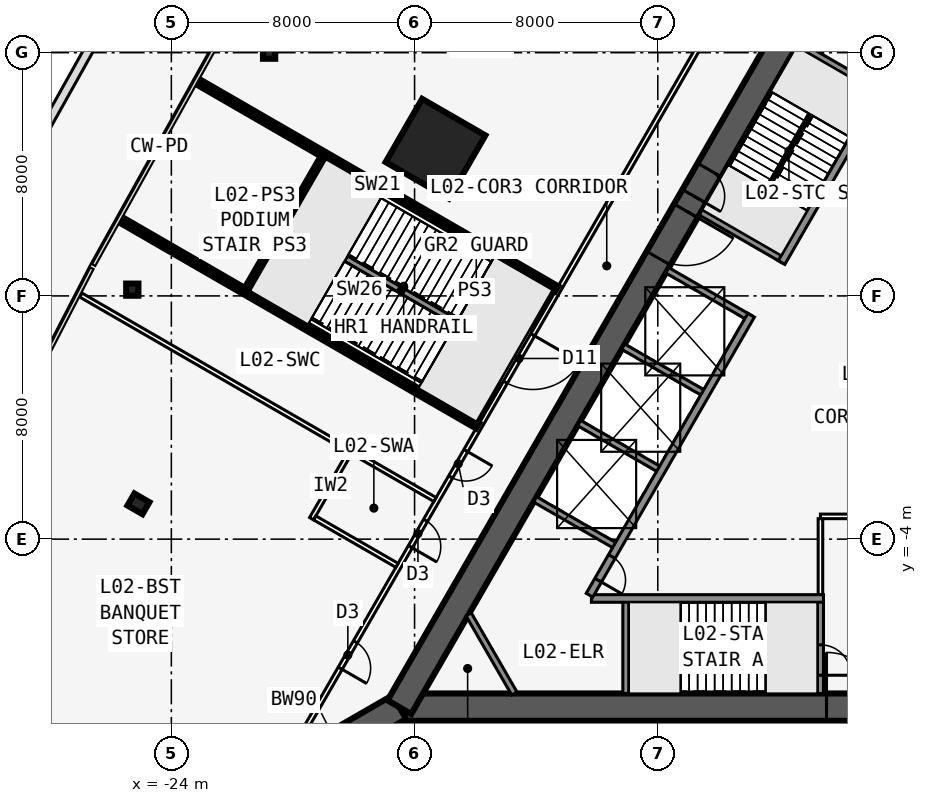
"""IFC4 building model, lengths in metres.
Left out: names, types, materials, properties, quantities, classifications, styles, units other than length and angle.
Written with IfcOpenShell. Run it as: python <this file> out.ifc"""

import sys

from ifc_helpers import new_model, si_unit, direction, frame, frame_2d, origin, origin_2d, place, context, subcontext, project, spatial, rectangle, i_section, extrude, element, fill, save


model = new_model("IFC4")
c1 = context("Model", 3, precision=1e-05, world=origin(), true_north=direction((0.0, 1.0)))
c2 = subcontext(c1, "Body", "Model", "MODEL_VIEW")
j1 = project(units=[si_unit("LENGTHUNIT", "METRE"), si_unit("PLANEANGLEUNIT", "RADIAN")], contexts=[c1])
p1 = place(None, origin())
s1 = spatial("IfcSite", under=j1, at=p1, CompositionType="ELEMENT")
p2 = place(p1, origin())
s2 = spatial("IfcBuilding", under=s1, at=p2, CompositionType="ELEMENT")
p3 = place(p2, frame((0.0, 0.0, 11.0)))
s3 = spatial("IfcBuildingStorey", under=s2, at=p3, CompositionType="ELEMENT", Elevation=11.0)
p4 = place(p3, frame((-16.5, -9.526, 0.0), z_axis=(0.0, 0.0, 1.0), x_axis=(1.0, 0.0, 0.0)))
e1 = element("IfcWall", 1, at=p4, inside=s3, PredefinedType="SHEAR", context=c2, shape_type="SweptSolid", body=[
    extrude(rectangle(XDim=33.0, YDim=0.9, at=frame_2d((16.5, 0.0))), origin(), (0.0, 0.0, 1.0), 6.5),
])
p5 = place(p4, frame((14.05, 0.0, 0.0)))
e2 = element("IfcOpeningElement", 2, at=p5, cuts=e1, PredefinedType="OPENING", context=c2, shape_type="SweptSolid", body=[
    extrude(rectangle(XDim=1.8, YDim=2.13, at=frame_2d((0.9, 1.065))), frame((0.0, 0.46, 0.0), z_axis=(0.0, -1.0, 0.0), x_axis=(1.0, 0.0, 0.0)), (0.0, 0.0, 1.0), 0.92),
])
p6 = place(p3, frame((-10.183, -5.951, 0.0), z_axis=(0.0, 0.0, 1.0), x_axis=(1.0, 0.0, 0.0)))
e3 = element("IfcWall", 3, at=p6, inside=s3, PredefinedType="SOLIDWALL", context=c2, shape_type="SweptSolid", body=[
    extrude(rectangle(XDim=7.633, YDim=0.25, at=frame_2d((3.816, 0.0))), origin(), (0.0, 0.0, 1.0), 6.25),
])
p7 = place(p3, frame((-9.05, -5.951, 0.0), z_axis=(0.0, 0.0, 1.0), x_axis=(0.0, -1.0, 0.0)))
e4 = element("IfcWall", 4, at=p7, inside=s3, PredefinedType="SOLIDWALL", context=c2, shape_type="SweptSolid", body=[
    extrude(rectangle(XDim=3.125, YDim=0.2, at=frame_2d((1.562, 0.0))), origin(), (0.0, 0.0, 1.0), 6.25),
])
p8 = place(p3, frame((-2.65, -5.951, 0.0), z_axis=(0.0, 0.0, 1.0), x_axis=(0.0, -1.0, 0.0)))
e5 = element("IfcWall", 5, at=p8, inside=s3, PredefinedType="SOLIDWALL", context=c2, shape_type="SweptSolid", body=[
    extrude(rectangle(XDim=3.125, YDim=0.2, at=frame_2d((1.562, 0.0))), origin(), (0.0, 0.0, 1.0), 6.25),
])
p9 = place(p8, frame((1.525, 0.0, 0.0)))
e6 = element("IfcOpeningElement", 6, at=p9, cuts=e5, PredefinedType="OPENING", context=c2, shape_type="SweptSolid", body=[
    extrude(rectangle(XDim=1.0, YDim=2.13, at=frame_2d((0.5, 1.065))), frame((0.0, 0.11, 0.0), z_axis=(0.0, -1.0, 0.0), x_axis=(1.0, 0.0, 0.0)), (0.0, 0.0, 1.0), 0.22),
])
p10 = place(p3, frame((0.0, 19.052, 0.0), z_axis=(0.0, 0.0, 1.0), x_axis=(-0.499999749417, -0.866025548458, 0.0)))
e7 = element("IfcWall", 7, at=p10, inside=s3, PredefinedType="SHEAR", context=c2, shape_type="SweptSolid", body=[
    extrude(rectangle(XDim=33.0, YDim=0.9, at=frame_2d((16.5, 0.0))), origin(), (0.0, 0.0, 1.0), 6.5),
])
p11 = place(p10, frame((14.15, 0.0, 0.0)))
e8 = element("IfcOpeningElement", 8, at=p11, cuts=e7, PredefinedType="OPENING", context=c2, shape_type="SweptSolid", body=[
    extrude(rectangle(XDim=1.8, YDim=2.13, at=frame_2d((0.9, 1.065))), frame((0.0, 0.46, 0.0), z_axis=(0.0, -1.0, 0.0), x_axis=(1.0, 0.0, 0.0)), (0.0, 0.0, 1.0), 0.92),
])
p12 = place(p10, frame((12.6, 0.0, 0.0)))
e9 = element("IfcOpeningElement", 9, at=p12, cuts=e7, PredefinedType="OPENING", context=c2, shape_type="SweptSolid", body=[
    extrude(rectangle(XDim=1.0, YDim=2.13, at=frame_2d((0.5, 1.065))), frame((0.0, 0.46, 0.0), z_axis=(0.0, -1.0, 0.0), x_axis=(1.0, 0.0, 0.0)), (0.0, 0.0, 1.0), 0.92),
])
p13 = place(p3, frame((-0.062, 11.794, 0.0), z_axis=(0.0, 0.0, 1.0), x_axis=(-0.500006680225, -0.86602154692, 0.0)))
e10 = element("IfcWall", 10, at=p13, inside=s3, PredefinedType="SOLIDWALL", context=c2, shape_type="SweptSolid", body=[
    extrude(rectangle(XDim=7.733, YDim=0.25, at=frame_2d((3.866, 0.0))), origin(), (0.0, 0.0, 1.0), 6.25),
])
p14 = place(p3, frame((-4.929, 3.365, 0.0), z_axis=(0.0, 0.0, 1.0), x_axis=(-0.499991433582, -0.866030349552, 0.0)))
e11 = element("IfcWall", 11, at=p14, inside=s3, PredefinedType="SOLIDWALL", context=c2, shape_type="SweptSolid", body=[
    extrude(rectangle(XDim=10.633, YDim=0.25, at=frame_2d((5.316, 0.0))), origin(), (0.0, 0.0, 1.0), 6.25),
])
p15 = place(p14, frame((9.164, 0.0, 0.0)))
e12 = element("IfcOpeningElement", 12, at=p15, cuts=e11, PredefinedType="OPENING", context=c2, shape_type="SweptSolid", body=[
    extrude(rectangle(XDim=0.9, YDim=2.13, at=frame_2d((0.45, 1.065))), frame((0.0, 0.135, 0.0), z_axis=(0.0, -1.0, 0.0), x_axis=(1.0, 0.0, 0.0)), (0.0, 0.0, 1.0), 0.27),
])
for number, where, z_axis, x_axis in (
    (13, (-0.679, 10.727, 0.0), (0.0, 0.0, 1.0), (-0.866, 0.5, 0.0)),
    (14, (-3.879, 5.184, 0.0), (0.0, 0.0, 1.0), (-0.866, 0.5, 0.0)),
    (15, (-4.979, 3.279, 0.0), (0.0, 0.0, 1.0), (-0.866, 0.5, 0.0)),
    (16, (-6.429, 0.767, 0.0), (0.0, 0.0, 1.0), (-0.866, 0.5, 0.0)),
    (17, (-7.879, -1.744, 0.0), (0.0, 0.0, 1.0), (-0.866, 0.5, 0.0)),
    (18, (-9.329, -4.256, 0.0), (0.0, 0.0, 1.0), (-0.866, 0.5, 0.0)),
):
    element("IfcWall", number, at=place(p3, frame(where, z_axis=z_axis, x_axis=x_axis)), inside=s3, PredefinedType="SOLIDWALL", context=c2, shape_type="SweptSolid", body=[
        extrude(rectangle(XDim=3.125, YDim=0.2, at=frame_2d((1.562, 0.0))), origin(), (0.0, 0.0, 1.0), 6.25),
    ])
p16 = place(p3, frame((-16.5, -9.526, 0.0), z_axis=(0.0, 0.0, 1.0), x_axis=(-0.866031398331, -0.499989616998, 0.0)))
e19 = element("IfcWall", 19, at=p16, inside=s3, PredefinedType="SHEAR", context=c2, shape_type="SweptSolid", body=[
    extrude(rectangle(XDim=4.746, YDim=0.9, at=frame_2d((2.373, 0.0))), origin(), (0.0, 0.0, 1.0), 6.5),
])
p17 = place(p16, frame((1.8, 0.0, 0.0)))
e20 = element("IfcOpeningElement", 20, at=p17, cuts=e19, PredefinedType="OPENING", context=c2, shape_type="SweptSolid", body=[
    extrude(rectangle(XDim=1.8, YDim=2.13, at=frame_2d((0.9, 1.065))), frame((0.0, 0.46, 0.0), z_axis=(0.0, -1.0, 0.0), x_axis=(1.0, 0.0, 0.0)), (0.0, 0.0, 1.0), 0.92),
])
for number, where, z_axis, x_axis in (
    (21, (-21.137, 6.43, 0.0), (0.0, 0.0, 1.0), (-0.866, 0.5, 0.0)),
    (22, (-25.083, -2.839, 0.0), (0.0, 0.0, 1.0), (-0.5, -0.866, 0.0)),
):
    element("IfcColumn", number, at=place(p3, frame(where, z_axis=z_axis, x_axis=x_axis)), inside=s3, PredefinedType="COLUMN", context=c2, shape_type="SweptSolid", body=[
        extrude(i_section(OverallWidth=0.455, OverallDepth=0.569, WebThickness=0.078, FlangeThickness=0.125, at=origin_2d()), origin(), (0.0, 0.0, 1.0), 6.5),
    ])
for number, where, z_axis, x_axis in (
    (23, (-20.785, 12.0, 0.0), (0.0, 0.0, 1.0), (1.0, 0.0, 0.0)),
    (24, (-25.285, 4.206, 0.0), (0.0, 0.0, 1.0), (1.0, 0.0, 0.0)),
):
    element("IfcColumn", number, at=place(p3, frame(where, z_axis=z_axis, x_axis=x_axis)), inside=s3, PredefinedType="COLUMN", context=c2, shape_type="SweptSolid", body=[
        extrude(i_section(OverallWidth=0.401, OverallDepth=0.399, WebThickness=0.025, FlangeThickness=0.04, at=origin_2d()), origin(), (0.0, 0.0, 1.0), 6.5),
    ])
p18 = place(p3, frame((-15.312, 8.84, 0.0), z_axis=(0.0, 0.0, 1.0), x_axis=(-0.866025403784, 0.5, 0.0)))
e25 = element("IfcColumn", 25, at=p18, inside=s3, PredefinedType="COLUMN", context=c2, shape_type="SweptSolid", body=[
    extrude(rectangle(XDim=2.4, YDim=2.4, at=origin_2d()), origin(), (0.0, 0.0, 1.0), 6.5),
])
p19 = place(p3, frame((-29.699, 6.76, 0.0), z_axis=(0.0, 0.0, 1.0), x_axis=(0.488409994099, 0.872614277711, 0.0)))
e26 = element("IfcWall", 26, at=p19, inside=s3, PredefinedType="PARAPET", context=c2, shape_type="SweptSolid", body=[
    extrude(rectangle(XDim=8.997, YDim=0.3, at=frame_2d((4.498, 0.0))), origin(), (0.0, 0.0, 1.0), 1.1),
])
p20 = place(p3, frame((-0.5, 22.836, 0.0), z_axis=(0.0, 0.0, 1.0), x_axis=(-0.500001677587, -0.866024435227, 0.0)))
e27 = element("IfcWall", 27, at=p20, inside=s3, PredefinedType="PARTITIONING", context=c2, shape_type="SweptSolid", body=[
    extrude(rectangle(XDim=39.054, YDim=0.15, at=frame_2d((19.527, 0.0))), origin(), (0.0, 0.0, 1.0), 5.308),
])
p21 = place(p20, frame((10.013, 0.0, 0.0)))
e28 = element("IfcOpeningElement", 28, at=p21, cuts=e27, PredefinedType="OPENING", context=c2, shape_type="SweptSolid", body=[
    extrude(rectangle(XDim=1.8, YDim=2.13, at=frame_2d((0.9, 1.065))), frame((0.0, 0.085, 0.0), z_axis=(0.0, -1.0, 0.0), x_axis=(1.0, 0.0, 0.0)), (0.0, 0.0, 1.0), 0.17),
])
p22 = place(p20, frame((23.227, 0.0, 0.0)))
e29 = element("IfcOpeningElement", 29, at=p22, cuts=e27, PredefinedType="OPENING", context=c2, shape_type="SweptSolid", body=[
    extrude(rectangle(XDim=1.8, YDim=2.13, at=frame_2d((0.9, 1.065))), frame((0.0, 0.085, 0.0), z_axis=(0.0, -1.0, 0.0), x_axis=(1.0, 0.0, 0.0)), (0.0, 0.0, 1.0), 0.17),
])
p23 = place(p20, frame((27.627, 0.0, 0.0)))
e30 = element("IfcOpeningElement", 30, at=p23, cuts=e27, PredefinedType="OPENING", context=c2, shape_type="SweptSolid", body=[
    extrude(rectangle(XDim=1.0, YDim=2.13, at=frame_2d((0.5, 1.065))), frame((0.0, 0.085, 0.0), z_axis=(0.0, -1.0, 0.0), x_axis=(1.0, 0.0, 0.0)), (0.0, 0.0, 1.0), 0.17),
])
p24 = place(p20, frame((30.277, 0.0, 0.0)))
e31 = element("IfcOpeningElement", 31, at=p24, cuts=e27, PredefinedType="OPENING", context=c2, shape_type="SweptSolid", body=[
    extrude(rectangle(XDim=1.0, YDim=2.13, at=frame_2d((0.5, 1.065))), frame((0.0, 0.085, 0.0), z_axis=(0.0, -1.0, 0.0), x_axis=(1.0, 0.0, 0.0)), (0.0, 0.0, 1.0), 0.17),
])
p25 = place(p20, frame((34.89, 0.0, 0.0)))
e32 = element("IfcOpeningElement", 32, at=p25, cuts=e27, PredefinedType="OPENING", context=c2, shape_type="SweptSolid", body=[
    extrude(rectangle(XDim=1.0, YDim=2.13, at=frame_2d((0.5, 1.065))), frame((0.0, 0.085, 0.0), z_axis=(0.0, -1.0, 0.0), x_axis=(1.0, 0.0, 0.0)), (0.0, 0.0, 1.0), 0.17),
])
p26 = place(p3, frame((-11.329, 4.231, 0.0), z_axis=(0.0, 0.0, 1.0), x_axis=(-0.866029620801, 0.499992695841, 0.0)))
e33 = element("IfcWall", 33, at=p26, inside=s3, PredefinedType="SHEAR", context=c2, shape_type="SweptSolid", body=[
    extrude(rectangle(XDim=13.607, YDim=0.2, at=frame_2d((6.804, 0.0))), origin(), (0.0, 0.0, 1.0), 6.5),
])
p27 = place(p3, frame((-13.928, -0.272, 0.0), z_axis=(0.0, 0.0, 1.0), x_axis=(-0.866022969634, 0.500004216049, 0.0)))
e34 = element("IfcWall", 34, at=p27, inside=s3, PredefinedType="SHEAR", context=c2, shape_type="SweptSolid", body=[
    extrude(rectangle(XDim=13.526, YDim=0.2, at=frame_2d((6.763, 0.0))), origin(), (0.0, 0.0, 1.0), 6.5),
])
p28 = place(p3, frame((-15.329, -2.697, 0.0), z_axis=(0.0, 0.0, 1.0), x_axis=(-0.866024753221, 0.500001126807, 0.0)))
e35 = element("IfcWall", 35, at=p28, inside=s3, PredefinedType="PARTITIONING", context=c2, shape_type="SweptSolid", body=[
    extrude(rectangle(XDim=13.448, YDim=0.15, at=frame_2d((6.724, 0.0))), origin(), (0.0, 0.0, 1.0), 5.308),
])
p29 = place(p3, frame((-18.137, -1.162, 0.0), z_axis=(0.0, 0.0, 1.0), x_axis=(-0.500004234368, -0.866022959057, 0.0)))
e36 = element("IfcWall", 36, at=p29, inside=s3, PredefinedType="PARTITIONING", context=c2, shape_type="SweptSolid", body=[
    extrude(rectangle(XDim=2.5, YDim=0.15, at=frame_2d((1.25, 0.0))), origin(), (0.0, 0.0, 1.0), 6.25),
])
p30 = place(p3, frame((-16.579, -4.862, 0.0), z_axis=(0.0, 0.0, 1.0), x_axis=(-0.866022959057, 0.500004234368, 0.0)))
e37 = element("IfcWall", 37, at=p30, inside=s3, PredefinedType="PARTITIONING", context=c2, shape_type="SweptSolid", body=[
    extrude(rectangle(XDim=3.125, YDim=0.15, at=frame_2d((1.562, 0.0))), origin(), (0.0, 0.0, 1.0), 6.25),
])
p31 = place(p3, frame((-2.65, -3.251, 0.0), z_axis=(0.0, 0.0, 1.0), x_axis=(1.0, 0.0, 0.0)))
e38 = element("IfcWall", 38, at=p31, inside=s3, PredefinedType="PARTITIONING", context=c2, shape_type="SweptSolid", body=[
    extrude(rectangle(XDim=8.35, YDim=0.15, at=frame_2d((4.175, 0.0))), origin(), (0.0, 0.0, 1.0), 6.25),
])
p32 = place(p3, frame((-2.65, -5.826, 0.0), z_axis=(0.0, 0.0, 1.0), x_axis=(0.0, 1.0, 0.0)))
e39 = element("IfcWall", 39, at=p32, inside=s3, PredefinedType="PARTITIONING", context=c2, shape_type="SweptSolid", body=[
    extrude(rectangle(XDim=2.5, YDim=0.15, at=frame_2d((1.25, 0.0))), origin(), (0.0, 0.0, 1.0), 6.25),
])
p33 = place(p3, frame((-12.719, -9.076, 0.0), z_axis=(0.0, 0.0, 1.0), x_axis=(-0.499952404951, 0.866052881055, 0.0)))
e40 = element("IfcWall", 40, at=p33, inside=s3, PredefinedType="SOLIDWALL", context=c2, shape_type="SweptSolid", body=[
    extrude(rectangle(XDim=3.002, YDim=0.2, at=frame_2d((1.501, 0.0))), origin(), (0.0, 0.0, 1.0), 6.25),
])
p34 = place(p3, frame((-7.247, -7.576, 0.0), z_axis=(0.0, 0.0, 1.0), x_axis=(1.0, 0.0, 0.0)))
e41 = element("IfcWall", 41, at=p34, inside=s3, PredefinedType="SOLIDWALL", context=c2, shape_type="SweptSolid", body=[
    extrude(rectangle(XDim=2.794, YDim=0.1, at=frame_2d((1.397, 0.0))), origin(), (0.0, 0.0, 1.0), 6.5),
])
p35 = place(p3, frame((-2.988, 9.978, 0.0), z_axis=(0.0, 0.0, 1.0), x_axis=(-0.499992232847, -0.866029888106, 0.0)))
e42 = element("IfcWall", 42, at=p35, inside=s3, PredefinedType="SOLIDWALL", context=c2, shape_type="SweptSolid", body=[
    extrude(rectangle(XDim=2.794, YDim=0.1, at=frame_2d((1.397, 0.0))), origin(), (0.0, 0.0, 1.0), 6.5),
])
p36 = place(p3, frame((-18.949, 8.631, 0.0), z_axis=(0.0, 0.0, 1.0), x_axis=(-0.500006934395, -0.866021400173, 0.0)))
e43 = element("IfcWall", 43, at=p36, inside=s3, PredefinedType="SHEAR", context=c2, shape_type="SweptSolid", body=[
    extrude(rectangle(XDim=5.2, YDim=0.2, at=frame_2d((2.6, 0.0))), origin(), (0.0, 0.0, 1.0), 6.5),
])
for number, where, z_axis, x_axis in (
    (44, (-11.422, 4.169, 0.0), (0.0, 0.0, 1.0), (-0.5, -0.866, 0.0)),
    (45, (-13.172, 1.138, 0.0), (0.0, 0.0, 1.0), (-0.5, -0.866, 0.0)),
):
    element("IfcWall", number, at=place(p3, frame(where, z_axis=z_axis, x_axis=x_axis)), inside=s3, PredefinedType="SOLIDWALL", context=c2, shape_type="SweptSolid", body=[
        extrude(rectangle(XDim=1.5, YDim=0.1, at=frame_2d((0.75, 0.0))), origin(), (0.0, 0.0, 1.0), 6.5),
    ])
p37 = place(p3, frame((-14.623, 3.131, 0.0), z_axis=(0.0, 0.0, 1.0), x_axis=(-0.866031452229, 0.49998952364, 0.0)))
e46 = element("IfcWall", 46, at=p37, inside=s3, PredefinedType="SOLIDWALL", context=c2, shape_type="SweptSolid", body=[
    extrude(rectangle(XDim=4.194, YDim=0.2, at=frame_2d((2.097, 0.0))), origin(), (0.0, 0.0, 1.0), 6.5),
])
p38 = place(p22, origin())
e47 = element("IfcDoor", 47, at=p38, inside=s3, OperationType="DOUBLE_DOOR_SINGLE_SWING", PredefinedType="DOOR", context=c2, shape_type="SweptSolid", body=[
    extrude(rectangle(XDim=1.8, YDim=2.13, at=frame_2d((0.9, 1.065))), frame((0.0, 0.025, 0.0), z_axis=(0.0, -1.0, 0.0), x_axis=(1.0, 0.0, 0.0)), (0.0, 0.0, 1.0), 0.05),
])
fill(e29, e47)
p39 = place(p23, origin())
e48 = element("IfcDoor", 48, at=p39, inside=s3, OperationType="SINGLE_SWING_LEFT", PredefinedType="DOOR", context=c2, shape_type="SweptSolid", body=[
    extrude(rectangle(XDim=1.0, YDim=2.13, at=frame_2d((0.5, 1.065))), frame((0.0, 0.025, 0.0), z_axis=(0.0, -1.0, 0.0), x_axis=(1.0, 0.0, 0.0)), (0.0, 0.0, 1.0), 0.05),
])
fill(e30, e48)
p40 = place(p24, origin())
e49 = element("IfcDoor", 49, at=p40, inside=s3, OperationType="SINGLE_SWING_RIGHT", PredefinedType="DOOR", context=c2, shape_type="SweptSolid", body=[
    extrude(rectangle(XDim=1.0, YDim=2.13, at=frame_2d((0.5, 1.065))), frame((0.0, 0.025, 0.0), z_axis=(0.0, -1.0, 0.0), x_axis=(1.0, 0.0, 0.0)), (0.0, 0.0, 1.0), 0.05),
])
fill(e31, e49)
p41 = place(p25, origin())
e50 = element("IfcDoor", 50, at=p41, inside=s3, OperationType="SINGLE_SWING_RIGHT", PredefinedType="DOOR", context=c2, shape_type="SweptSolid", body=[
    extrude(rectangle(XDim=1.0, YDim=2.13, at=frame_2d((0.5, 1.065))), frame((0.0, 0.025, 0.0), z_axis=(0.0, -1.0, 0.0), x_axis=(1.0, 0.0, 0.0)), (0.0, 0.0, 1.0), 0.05),
])
fill(e32, e50)
p42 = place(p5, origin())
e51 = element("IfcDoor", 51, at=p42, inside=s3, OperationType="DOUBLE_DOOR_SINGLE_SWING", PredefinedType="DOOR", context=c2, shape_type="SweptSolid", body=[
    extrude(rectangle(XDim=1.8, YDim=2.13, at=frame_2d((0.9, 1.065))), frame((0.0, 0.025, 0.0), z_axis=(0.0, -1.0, 0.0), x_axis=(1.0, 0.0, 0.0)), (0.0, 0.0, 1.0), 0.05),
])
fill(e2, e51)
p43 = place(p9, origin())
e52 = element("IfcDoor", 52, at=p43, inside=s3, OperationType="SINGLE_SWING_RIGHT", PredefinedType="DOOR", context=c2, shape_type="SweptSolid", body=[
    extrude(rectangle(XDim=1.0, YDim=2.13, at=frame_2d((0.5, 1.065))), frame((0.0, 0.025, 0.0), z_axis=(0.0, -1.0, 0.0), x_axis=(1.0, 0.0, 0.0)), (0.0, 0.0, 1.0), 0.05),
])
fill(e6, e52)
p44 = place(p11, origin())
e53 = element("IfcDoor", 53, at=p44, inside=s3, OperationType="DOUBLE_DOOR_SINGLE_SWING", PredefinedType="DOOR", context=c2, shape_type="SweptSolid", body=[
    extrude(rectangle(XDim=1.8, YDim=2.13, at=frame_2d((0.9, 1.065))), frame((0.0, 0.025, 0.0), z_axis=(0.0, -1.0, 0.0), x_axis=(1.0, 0.0, 0.0)), (0.0, 0.0, 1.0), 0.05),
])
fill(e8, e53)
p45 = place(p12, origin())
e54 = element("IfcDoor", 54, at=p45, inside=s3, OperationType="SINGLE_SWING_RIGHT", PredefinedType="DOOR", context=c2, shape_type="SweptSolid", body=[
    extrude(rectangle(XDim=1.0, YDim=2.13, at=frame_2d((0.5, 1.065))), frame((0.0, 0.025, 0.0), z_axis=(0.0, -1.0, 0.0), x_axis=(1.0, 0.0, 0.0)), (0.0, 0.0, 1.0), 0.05),
])
fill(e9, e54)
p46 = place(p15, origin())
e55 = element("IfcDoor", 55, at=p46, inside=s3, OperationType="SINGLE_SWING_RIGHT", PredefinedType="DOOR", context=c2, shape_type="SweptSolid", body=[
    extrude(rectangle(XDim=0.9, YDim=2.13, at=frame_2d((0.45, 1.065))), frame((0.0, 0.025, 0.0), z_axis=(0.0, -1.0, 0.0), x_axis=(1.0, 0.0, 0.0)), (0.0, 0.0, 1.0), 0.05),
])
fill(e12, e55)
save(model, sys.argv[1])
